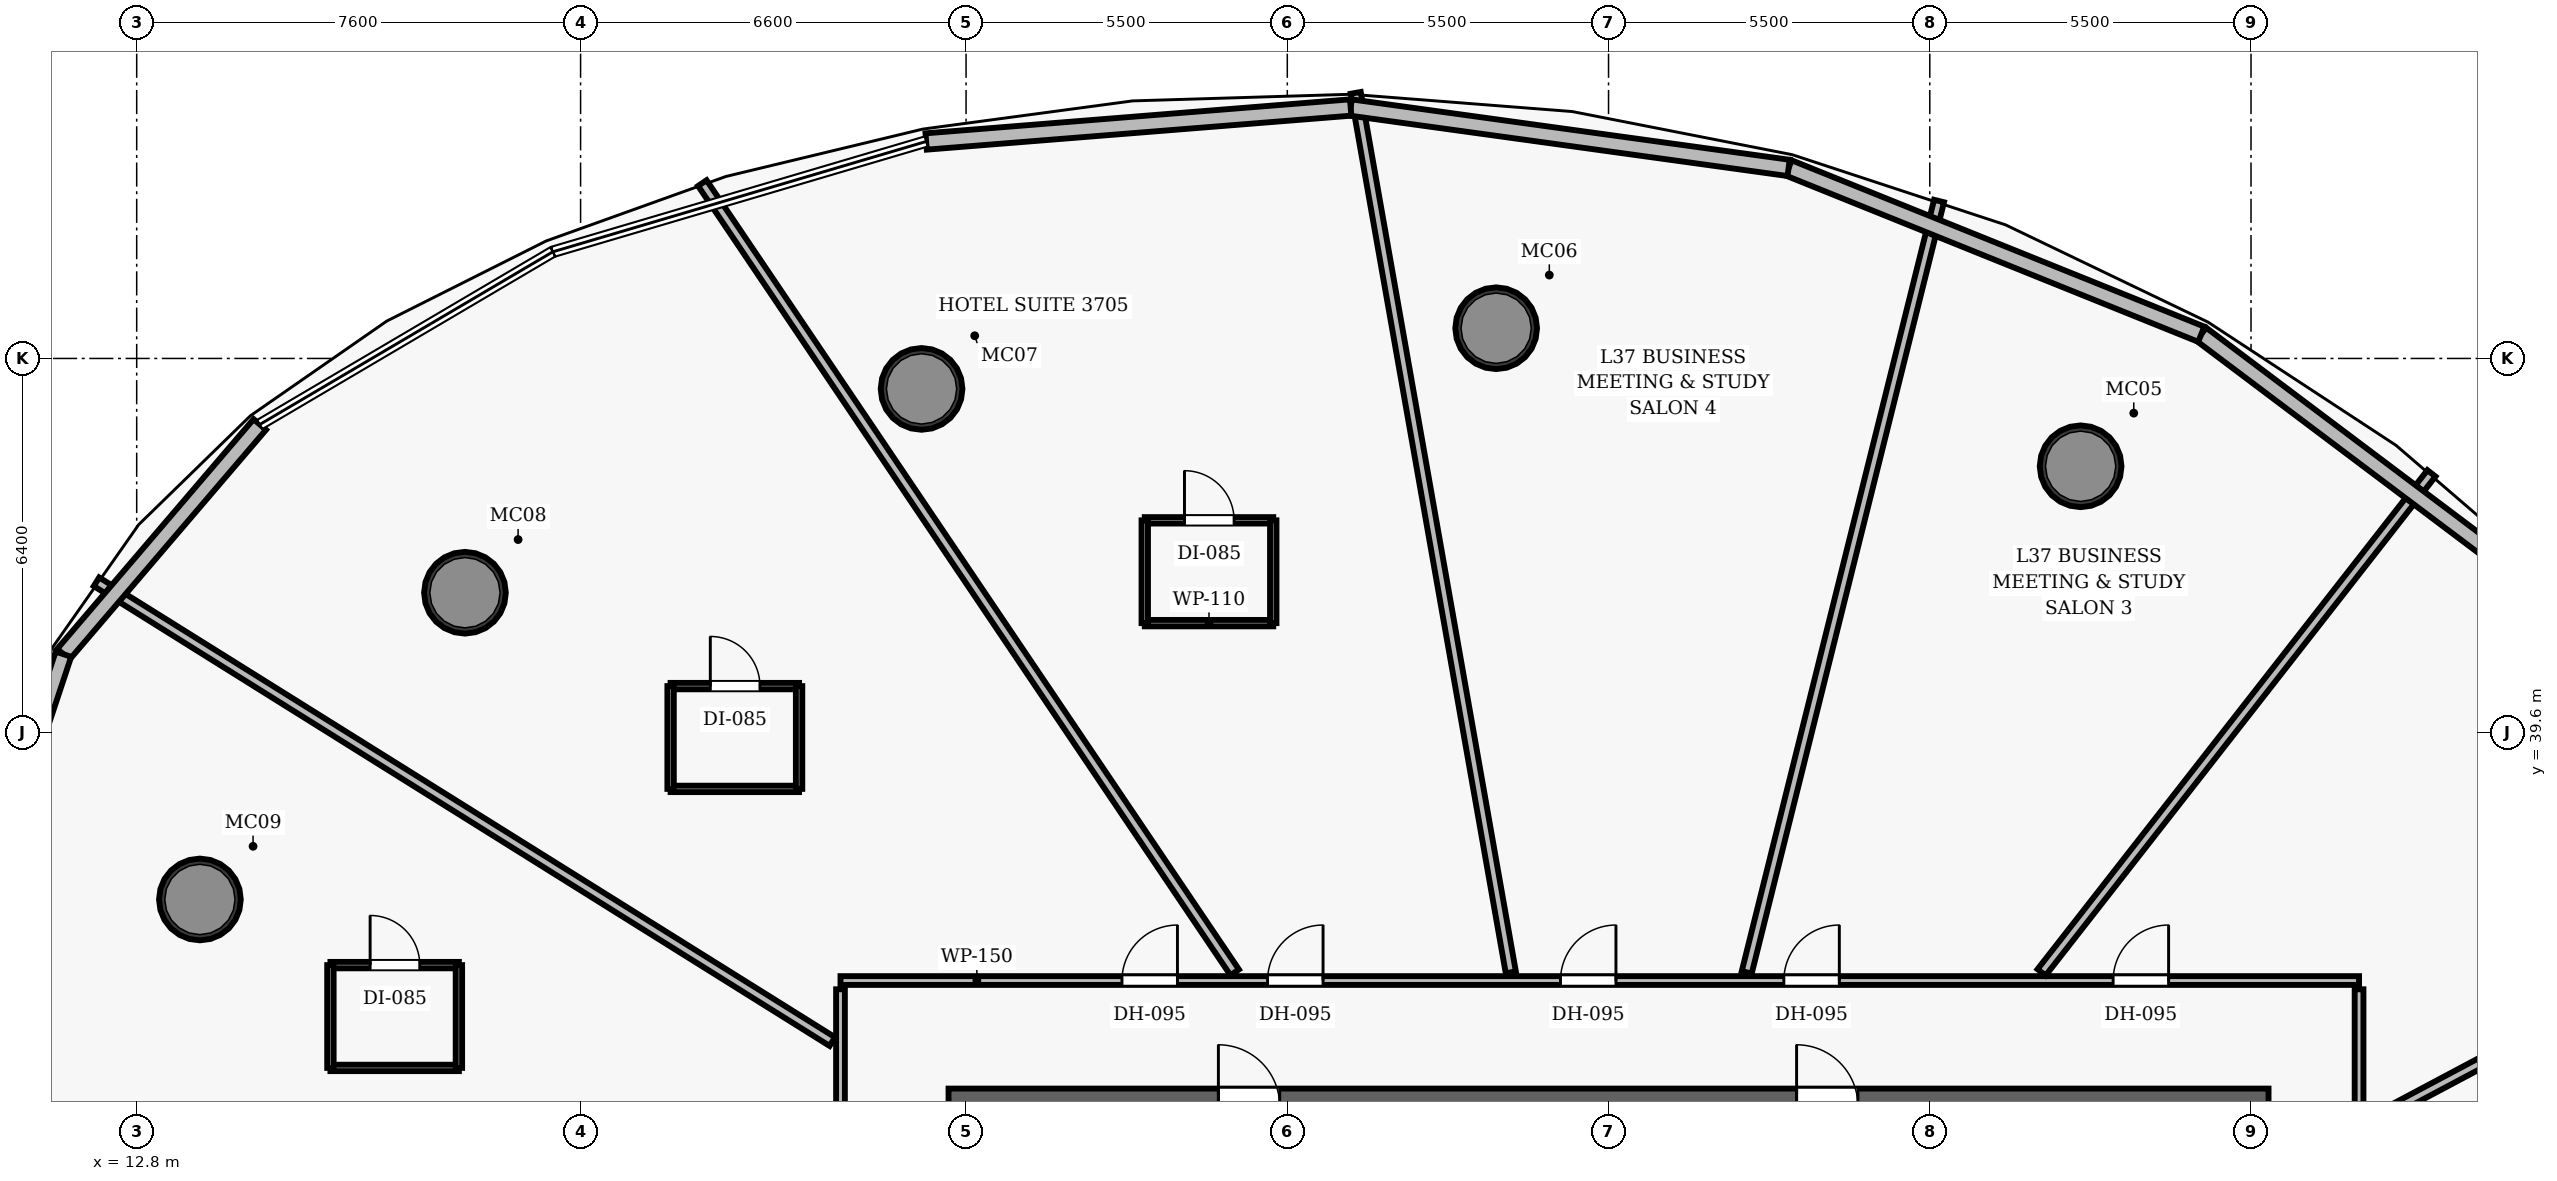
"""IFC4 building model, lengths in metres.
Left out: names, types, materials, properties, quantities, classifications, styles, units other than length and angle.
Written with IfcOpenShell. Run it as: python <this file> out.ifc"""

import sys

from ifc_helpers import new_model, si_unit, direction, frame, frame_2d, origin, origin_2d, place, context, subcontext, project, spatial, rectangle, hollow_circle, extrude, element, fill, save


model = new_model("IFC4")
c1 = context("Model", 3, precision=1e-05, world=origin(), true_north=direction((0.0, 1.0)))
c2 = subcontext(c1, "Body", "Model", "MODEL_VIEW")
j1 = project(units=[si_unit("LENGTHUNIT", "METRE"), si_unit("PLANEANGLEUNIT", "RADIAN")], contexts=[c1])
p1 = place(None, origin())
s1 = spatial("IfcSite", under=j1, at=p1, CompositionType="ELEMENT")
p2 = place(p1, origin())
s2 = spatial("IfcBuilding", under=s1, at=p2, CompositionType="ELEMENT")
p3 = place(p2, frame((0.0, 0.0, 148.3)))
s3 = spatial("IfcBuildingStorey", under=s2, at=p3, CompositionType="ELEMENT", Elevation=148.3)
p4 = place(p3, frame((26.7, 33.2, 0.0), z_axis=(0.0, 0.0, 1.0), x_axis=(1.0, 0.0, 0.0)))
e1 = element("IfcWall", 1, at=p4, inside=s3, PredefinedType="SHEAR", context=c2, shape_type="SweptSolid", body=[
    extrude(rectangle(XDim=22.6, YDim=0.6, at=frame_2d((11.3, 0.0))), origin(), (0.0, 0.0, 1.0), 3.5),
])
p5 = place(p4, frame((4.62, 0.0, 0.0)))
e2 = element("IfcOpeningElement", 2, at=p5, cuts=e1, PredefinedType="OPENING", context=c2, shape_type="SweptSolid", body=[
    extrude(rectangle(XDim=1.05, YDim=2.15, at=frame_2d((0.525, 1.075))), frame((0.0, 0.31, 0.0), z_axis=(0.0, -1.0, 0.0), x_axis=(1.0, 0.0, 0.0)), (0.0, 0.0, 1.0), 0.62),
])
p6 = place(p4, frame((14.52, 0.0, 0.0)))
e3 = element("IfcOpeningElement", 3, at=p6, cuts=e1, PredefinedType="OPENING", context=c2, shape_type="SweptSolid", body=[
    extrude(rectangle(XDim=1.05, YDim=2.15, at=frame_2d((0.525, 1.075))), frame((0.0, 0.31, 0.0), z_axis=(0.0, -1.0, 0.0), x_axis=(1.0, 0.0, 0.0)), (0.0, 0.0, 1.0), 0.62),
])
for number, where, z_axis, x_axis in (
    (4, (46.083, 44.154, 0.0), (0.0, 0.0, 1.0), (1.0, 0.0, 0.0)),
    (5, (36.076, 46.517, 0.0), (0.0, 0.0, 1.0), (1.0, 0.0, 0.0)),
    (6, (26.238, 45.479, 0.0), (0.0, 0.0, 1.0), (1.0, 0.0, 0.0)),
    (7, (18.42, 41.989, 0.0), (0.0, 0.0, 1.0), (1.0, 0.0, 0.0)),
    (8, (13.882, 36.738, 0.0), (0.0, 0.0, 1.0), (1.0, 0.0, 0.0)),
):
    element("IfcColumn", number, at=place(p3, frame(where, z_axis=z_axis, x_axis=x_axis)), inside=s3, PredefinedType="COLUMN", context=c2, shape_type="SweptSolid", body=[
        extrude(hollow_circle(Radius=0.7, WallThickness=0.055, at=origin_2d()), origin(), (0.0, 0.0, 1.0), 3.5),
    ])
p7 = place(p3, frame((24.85, 35.35, 0.0), z_axis=(0.0, 0.0, 1.0), x_axis=(1.0, 0.0, 0.0)))
e9 = element("IfcWall", 9, at=p7, inside=s3, PredefinedType="PARTITIONING", context=c2, shape_type="SweptSolid", body=[
    extrude(rectangle(XDim=26.0, YDim=0.15, at=frame_2d((13.0, 0.0))), origin(), (0.0, 0.0, 1.0), 2.675),
])
p8 = place(p7, frame((21.789, 0.0, 0.0)))
e10 = element("IfcOpeningElement", 10, at=p8, cuts=e9, PredefinedType="OPENING", context=c2, shape_type="SweptSolid", body=[
    extrude(rectangle(XDim=0.95, YDim=2.15, at=frame_2d((0.475, 1.075))), frame((0.0, 0.085, 0.0), z_axis=(0.0, -1.0, 0.0), x_axis=(1.0, 0.0, 0.0)), (0.0, 0.0, 1.0), 0.17),
])
p9 = place(p7, frame((16.151, 0.0, 0.0)))
e11 = element("IfcOpeningElement", 11, at=p9, cuts=e9, PredefinedType="OPENING", context=c2, shape_type="SweptSolid", body=[
    extrude(rectangle(XDim=0.95, YDim=2.15, at=frame_2d((0.475, 1.075))), frame((0.0, 0.085, 0.0), z_axis=(0.0, -1.0, 0.0), x_axis=(1.0, 0.0, 0.0)), (0.0, 0.0, 1.0), 0.17),
])
p10 = place(p7, frame((12.327, 0.0, 0.0)))
e12 = element("IfcOpeningElement", 12, at=p10, cuts=e9, PredefinedType="OPENING", context=c2, shape_type="SweptSolid", body=[
    extrude(rectangle(XDim=0.95, YDim=2.15, at=frame_2d((0.475, 1.075))), frame((0.0, 0.085, 0.0), z_axis=(0.0, -1.0, 0.0), x_axis=(1.0, 0.0, 0.0)), (0.0, 0.0, 1.0), 0.17),
])
p11 = place(p7, frame((7.312, 0.0, 0.0)))
e13 = element("IfcOpeningElement", 13, at=p11, cuts=e9, PredefinedType="OPENING", context=c2, shape_type="SweptSolid", body=[
    extrude(rectangle(XDim=0.95, YDim=2.15, at=frame_2d((0.475, 1.075))), frame((0.0, 0.085, 0.0), z_axis=(0.0, -1.0, 0.0), x_axis=(1.0, 0.0, 0.0)), (0.0, 0.0, 1.0), 0.17),
])
p12 = place(p7, frame((4.819, 0.0, 0.0)))
e14 = element("IfcOpeningElement", 14, at=p12, cuts=e9, PredefinedType="OPENING", context=c2, shape_type="SweptSolid", body=[
    extrude(rectangle(XDim=0.95, YDim=2.15, at=frame_2d((0.475, 1.075))), frame((0.0, 0.085, 0.0), z_axis=(0.0, -1.0, 0.0), x_axis=(1.0, 0.0, 0.0)), (0.0, 0.0, 1.0), 0.17),
])
p13 = place(p3, frame((24.85, 27.08, 0.0), z_axis=(0.0, 0.0, 1.0), x_axis=(0.0, 1.0, 0.0)))
e15 = element("IfcWall", 15, at=p13, inside=s3, PredefinedType="PARTITIONING", context=c2, shape_type="SweptSolid", body=[
    extrude(rectangle(XDim=8.12, YDim=0.15, at=frame_2d((4.06, 0.0))), origin(), (0.0, 0.0, 1.0), 2.675),
])
p14 = place(p13, frame((1.77, 0.0, 0.0)))
e16 = element("IfcOpeningElement", 16, at=p14, cuts=e15, PredefinedType="OPENING", context=c2, shape_type="SweptSolid", body=[
    extrude(rectangle(XDim=0.95, YDim=2.15, at=frame_2d((0.475, 1.075))), frame((0.0, 0.085, 0.0), z_axis=(0.0, -1.0, 0.0), x_axis=(1.0, 0.0, 0.0)), (0.0, 0.0, 1.0), 0.17),
])
p15 = place(p3, frame((50.85, 27.08, 0.0), z_axis=(0.0, 0.0, 1.0), x_axis=(0.0, 1.0, 0.0)))
e17 = element("IfcWall", 17, at=p15, inside=s3, PredefinedType="PARTITIONING", context=c2, shape_type="SweptSolid", body=[
    extrude(rectangle(XDim=8.12, YDim=0.15, at=frame_2d((4.06, 0.0))), origin(), (0.0, 0.0, 1.0), 2.675),
])
p16 = place(p15, frame((1.054, 0.0, 0.0)))
e18 = element("IfcOpeningElement", 18, at=p16, cuts=e17, PredefinedType="OPENING", context=c2, shape_type="SweptSolid", body=[
    extrude(rectangle(XDim=0.95, YDim=2.15, at=frame_2d((0.475, 1.075))), frame((0.0, 0.085, 0.0), z_axis=(0.0, -1.0, 0.0), x_axis=(1.0, 0.0, 0.0)), (0.0, 0.0, 1.0), 0.17),
])
p17 = place(p3, frame((50.99, 32.907, 0.0), z_axis=(0.0, 0.0, 1.0), x_axis=(0.882956390808, 0.469455015877, 0.0)))
e19 = element("IfcWall", 19, at=p17, inside=s3, PredefinedType="PARTITIONING", context=c2, shape_type="SweptSolid", body=[
    extrude(rectangle(XDim=8.613, YDim=0.175, at=frame_2d((4.307, 0.0))), origin(), (0.0, 0.0, 1.0), 2.675),
])
p18 = place(p3, frame((45.414, 35.49, 0.0), z_axis=(0.0, 0.0, 1.0), x_axis=(0.615657151534, 0.788014131704, 0.0)))
e20 = element("IfcWall", 20, at=p18, inside=s3, PredefinedType="PARTITIONING", context=c2, shape_type="SweptSolid", body=[
    extrude(rectangle(XDim=10.842, YDim=0.175, at=frame_2d((5.421, 0.0))), origin(), (0.0, 0.0, 1.0), 2.675),
])
p19 = place(p3, frame((40.366, 35.49, 0.0), z_axis=(0.0, 0.0, 1.0), x_axis=(0.241919334029, 0.970296364944, 0.0)))
e21 = element("IfcWall", 21, at=p19, inside=s3, PredefinedType="PARTITIONING", context=c2, shape_type="SweptSolid", body=[
    extrude(rectangle(XDim=13.61, YDim=0.175, at=frame_2d((6.805, 0.0))), origin(), (0.0, 0.0, 1.0), 2.675),
])
p20 = place(p3, frame((36.327, 35.49, 0.0), z_axis=(0.0, 0.0, 1.0), x_axis=(-0.173651426597, 0.984807180133, 0.0)))
e22 = element("IfcWall", 22, at=p20, inside=s3, PredefinedType="PARTITIONING", context=c2, shape_type="SweptSolid", body=[
    extrude(rectangle(XDim=15.289, YDim=0.175, at=frame_2d((7.645, 0.0))), origin(), (0.0, 0.0, 1.0), 2.675),
])
p21 = place(p3, frame((31.599, 35.49, 0.0), z_axis=(0.0, 0.0, 1.0), x_axis=(-0.55918931687, 0.829039991736, 0.0)))
e23 = element("IfcWall", 23, at=p21, inside=s3, PredefinedType="PARTITIONING", context=c2, shape_type="SweptSolid", body=[
    extrude(rectangle(XDim=16.299, YDim=0.175, at=frame_2d((8.149, 0.0))), origin(), (0.0, 0.0, 1.0), 2.675),
])
p22 = place(p3, frame((24.71, 34.304, 0.0), z_axis=(0.0, 0.0, 1.0), x_axis=(-0.848041694206, 0.529929509357, 0.0)))
e24 = element("IfcWall", 24, at=p22, inside=s3, PredefinedType="PARTITIONING", context=c2, shape_type="SweptSolid", body=[
    extrude(rectangle(XDim=14.856, YDim=0.175, at=frame_2d((7.428, 0.0))), origin(), (0.0, 0.0, 1.0), 2.675),
])
p23 = place(p3, frame((30.06, 41.469, 0.0), z_axis=(0.0, 0.0, 1.0), x_axis=(1.0, 0.0, 0.0)))
e25 = element("IfcWall", 25, at=p23, inside=s3, PredefinedType="PARTITIONING", context=c2, shape_type="SweptSolid", body=[
    extrude(rectangle(XDim=2.2, YDim=0.11, at=frame_2d((1.1, 0.0))), origin(), (0.0, 0.0, 1.0), 2.675),
])
p24 = place(p3, frame((30.06, 43.229, 0.0), z_axis=(0.0, 0.0, 1.0), x_axis=(1.0, 0.0, 0.0)))
e26 = element("IfcWall", 26, at=p24, inside=s3, PredefinedType="PARTITIONING", context=c2, shape_type="SweptSolid", body=[
    extrude(rectangle(XDim=2.2, YDim=0.11, at=frame_2d((1.1, 0.0))), origin(), (0.0, 0.0, 1.0), 2.675),
])
p25 = place(p24, frame((0.68, 0.0, 0.0)))
e27 = element("IfcOpeningElement", 27, at=p25, cuts=e26, PredefinedType="OPENING", context=c2, shape_type="SweptSolid", body=[
    extrude(rectangle(XDim=0.85, YDim=2.1, at=frame_2d((0.425, 1.05))), frame((0.0, 0.065, 0.0), z_axis=(0.0, -1.0, 0.0), x_axis=(1.0, 0.0, 0.0)), (0.0, 0.0, 1.0), 0.13),
])
for number, where, z_axis, x_axis in (
    (28, (30.06, 41.469, 0.0), (0.0, 0.0, 1.0), (0.0, 1.0, 0.0)),
    (29, (32.26, 41.469, 0.0), (0.0, 0.0, 1.0), (0.0, 1.0, 0.0)),
):
    element("IfcWall", number, at=place(p3, frame(where, z_axis=z_axis, x_axis=x_axis)), inside=s3, PredefinedType="PARTITIONING", context=c2, shape_type="SweptSolid", body=[
        extrude(rectangle(XDim=1.76, YDim=0.11, at=frame_2d((0.88, 0.0))), origin(), (0.0, 0.0, 1.0), 2.675),
    ])
p26 = place(p3, frame((21.941, 38.631, 0.0), z_axis=(0.0, 0.0, 1.0), x_axis=(1.0, 0.0, 0.0)))
e30 = element("IfcWall", 30, at=p26, inside=s3, PredefinedType="PARTITIONING", context=c2, shape_type="SweptSolid", body=[
    extrude(rectangle(XDim=2.2, YDim=0.11, at=frame_2d((1.1, 0.0))), origin(), (0.0, 0.0, 1.0), 2.675),
])
p27 = place(p3, frame((21.941, 40.391, 0.0), z_axis=(0.0, 0.0, 1.0), x_axis=(1.0, 0.0, 0.0)))
e31 = element("IfcWall", 31, at=p27, inside=s3, PredefinedType="PARTITIONING", context=c2, shape_type="SweptSolid", body=[
    extrude(rectangle(XDim=2.2, YDim=0.11, at=frame_2d((1.1, 0.0))), origin(), (0.0, 0.0, 1.0), 2.675),
])
p28 = place(p27, frame((0.68, 0.0, 0.0)))
e32 = element("IfcOpeningElement", 32, at=p28, cuts=e31, PredefinedType="OPENING", context=c2, shape_type="SweptSolid", body=[
    extrude(rectangle(XDim=0.85, YDim=2.1, at=frame_2d((0.425, 1.05))), frame((0.0, 0.065, 0.0), z_axis=(0.0, -1.0, 0.0), x_axis=(1.0, 0.0, 0.0)), (0.0, 0.0, 1.0), 0.13),
])
for number, where, z_axis, x_axis in (
    (33, (21.941, 38.631, 0.0), (0.0, 0.0, 1.0), (0.0, 1.0, 0.0)),
    (34, (24.141, 38.631, 0.0), (0.0, 0.0, 1.0), (0.0, 1.0, 0.0)),
):
    element("IfcWall", number, at=place(p3, frame(where, z_axis=z_axis, x_axis=x_axis)), inside=s3, PredefinedType="PARTITIONING", context=c2, shape_type="SweptSolid", body=[
        extrude(rectangle(XDim=1.76, YDim=0.11, at=frame_2d((0.88, 0.0))), origin(), (0.0, 0.0, 1.0), 2.675),
    ])
p29 = place(p3, frame((16.117, 33.854, 0.0), z_axis=(0.0, 0.0, 1.0), x_axis=(1.0, 0.0, 0.0)))
e35 = element("IfcWall", 35, at=p29, inside=s3, PredefinedType="PARTITIONING", context=c2, shape_type="SweptSolid", body=[
    extrude(rectangle(XDim=2.2, YDim=0.11, at=frame_2d((1.1, 0.0))), origin(), (0.0, 0.0, 1.0), 2.675),
])
p30 = place(p3, frame((16.117, 35.614, 0.0), z_axis=(0.0, 0.0, 1.0), x_axis=(1.0, 0.0, 0.0)))
e36 = element("IfcWall", 36, at=p30, inside=s3, PredefinedType="PARTITIONING", context=c2, shape_type="SweptSolid", body=[
    extrude(rectangle(XDim=2.2, YDim=0.11, at=frame_2d((1.1, 0.0))), origin(), (0.0, 0.0, 1.0), 2.675),
])
p31 = place(p30, frame((0.68, 0.0, 0.0)))
e37 = element("IfcOpeningElement", 37, at=p31, cuts=e36, PredefinedType="OPENING", context=c2, shape_type="SweptSolid", body=[
    extrude(rectangle(XDim=0.85, YDim=2.1, at=frame_2d((0.425, 1.05))), frame((0.0, 0.065, 0.0), z_axis=(0.0, -1.0, 0.0), x_axis=(1.0, 0.0, 0.0)), (0.0, 0.0, 1.0), 0.13),
])
for number, where, z_axis, x_axis in (
    (38, (16.117, 33.854, 0.0), (0.0, 0.0, 1.0), (0.0, 1.0, 0.0)),
    (39, (18.317, 33.854, 0.0), (0.0, 0.0, 1.0), (0.0, 1.0, 0.0)),
):
    element("IfcWall", number, at=place(p3, frame(where, z_axis=z_axis, x_axis=x_axis)), inside=s3, PredefinedType="PARTITIONING", context=c2, shape_type="SweptSolid", body=[
        extrude(rectangle(XDim=1.76, YDim=0.11, at=frame_2d((0.88, 0.0))), origin(), (0.0, 0.0, 1.0), 2.675),
    ])
p32 = place(p3, frame((48.148, 46.415, 0.0), z_axis=(0.0, 0.0, 1.0), x_axis=(0.799187740933, -0.601081487606, 0.0)))
e40 = element("IfcWall", 40, at=p32, inside=s3, PredefinedType="SOLIDWALL", context=c2, shape_type="SweptSolid", body=[
    extrude(rectangle(XDim=7.617, YDim=0.28, at=frame_2d((3.809, 0.0))), origin(), (0.0, 0.0, 1.0), 3.26),
])
p33 = place(p3, frame((41.083, 49.262, 0.0), z_axis=(0.0, 0.0, 1.0), x_axis=(0.927496504314, -0.373831826474, 0.0)))
e41 = element("IfcWall", 41, at=p33, inside=s3, PredefinedType="SOLIDWALL", context=c2, shape_type="SweptSolid", body=[
    extrude(rectangle(XDim=7.617, YDim=0.28, at=frame_2d((3.809, 0.0))), origin(), (0.0, 0.0, 1.0), 3.26),
])
p34 = place(p3, frame((33.585, 50.296, 0.0), z_axis=(0.0, 0.0, 1.0), x_axis=(0.99062609674, -0.136601377953, 0.0)))
e42 = element("IfcWall", 42, at=p34, inside=s3, PredefinedType="SOLIDWALL", context=c2, shape_type="SweptSolid", body=[
    extrude(rectangle(XDim=7.569, YDim=0.28, at=frame_2d((3.785, 0.0))), origin(), (0.0, 0.0, 1.0), 3.26),
])
p35 = place(p3, frame((26.316, 49.714, 0.0), z_axis=(0.0, 0.0, 1.0), x_axis=(0.996812190565, 0.079783812519, 0.0)))
e43 = element("IfcWall", 43, at=p35, inside=s3, PredefinedType="SOLIDWALL", context=c2, shape_type="SweptSolid", body=[
    extrude(rectangle(XDim=7.292, YDim=0.28, at=frame_2d((3.646, 0.0))), origin(), (0.0, 0.0, 1.0), 3.26),
])
for number, where, z_axis, x_axis in (
    (44, (11.545, 40.937, 0.0), (0.0, 0.0, 1.0), (0.65, 0.76, 0.0)),
    (45, (9.915, 36.026, 0.0), (0.0, 0.0, 1.0), (0.315, 0.949, 0.0)),
):
    element("IfcWall", number, at=place(p3, frame(where, z_axis=z_axis, x_axis=x_axis)), inside=s3, PredefinedType="SOLIDWALL", context=c2, shape_type="SweptSolid", body=[
        extrude(rectangle(XDim=5.174, YDim=0.28, at=frame_2d((2.587, 0.0))), origin(), (0.0, 0.0, 1.0), 3.26),
    ])
p36 = place(p8, origin())
e46 = element("IfcDoor", 46, at=p36, inside=s3, OperationType="SINGLE_SWING_RIGHT", PredefinedType="DOOR", context=c2, shape_type="SweptSolid", body=[
    extrude(rectangle(XDim=0.95, YDim=2.15, at=frame_2d((0.475, 1.075))), frame((0.0, 0.025, 0.0), z_axis=(0.0, -1.0, 0.0), x_axis=(1.0, 0.0, 0.0)), (0.0, 0.0, 1.0), 0.05),
])
fill(e10, e46)
p37 = place(p9, origin())
e47 = element("IfcDoor", 47, at=p37, inside=s3, OperationType="SINGLE_SWING_RIGHT", PredefinedType="DOOR", context=c2, shape_type="SweptSolid", body=[
    extrude(rectangle(XDim=0.95, YDim=2.15, at=frame_2d((0.475, 1.075))), frame((0.0, 0.025, 0.0), z_axis=(0.0, -1.0, 0.0), x_axis=(1.0, 0.0, 0.0)), (0.0, 0.0, 1.0), 0.05),
])
fill(e11, e47)
p38 = place(p10, origin())
e48 = element("IfcDoor", 48, at=p38, inside=s3, OperationType="SINGLE_SWING_RIGHT", PredefinedType="DOOR", context=c2, shape_type="SweptSolid", body=[
    extrude(rectangle(XDim=0.95, YDim=2.15, at=frame_2d((0.475, 1.075))), frame((0.0, 0.025, 0.0), z_axis=(0.0, -1.0, 0.0), x_axis=(1.0, 0.0, 0.0)), (0.0, 0.0, 1.0), 0.05),
])
fill(e12, e48)
p39 = place(p11, origin())
e49 = element("IfcDoor", 49, at=p39, inside=s3, OperationType="SINGLE_SWING_RIGHT", PredefinedType="DOOR", context=c2, shape_type="SweptSolid", body=[
    extrude(rectangle(XDim=0.95, YDim=2.15, at=frame_2d((0.475, 1.075))), frame((0.0, 0.025, 0.0), z_axis=(0.0, -1.0, 0.0), x_axis=(1.0, 0.0, 0.0)), (0.0, 0.0, 1.0), 0.05),
])
fill(e13, e49)
p40 = place(p25, origin())
e50 = element("IfcDoor", 50, at=p40, inside=s3, OperationType="SINGLE_SWING_LEFT", PredefinedType="DOOR", context=c2, shape_type="SweptSolid", body=[
    extrude(rectangle(XDim=0.85, YDim=2.1, at=frame_2d((0.425, 1.05))), frame((0.0, 0.025, 0.0), z_axis=(0.0, -1.0, 0.0), x_axis=(1.0, 0.0, 0.0)), (0.0, 0.0, 1.0), 0.05),
])
fill(e27, e50)
p41 = place(p12, origin())
e51 = element("IfcDoor", 51, at=p41, inside=s3, OperationType="SINGLE_SWING_RIGHT", PredefinedType="DOOR", context=c2, shape_type="SweptSolid", body=[
    extrude(rectangle(XDim=0.95, YDim=2.15, at=frame_2d((0.475, 1.075))), frame((0.0, 0.025, 0.0), z_axis=(0.0, -1.0, 0.0), x_axis=(1.0, 0.0, 0.0)), (0.0, 0.0, 1.0), 0.05),
])
fill(e14, e51)
p42 = place(p28, origin())
e52 = element("IfcDoor", 52, at=p42, inside=s3, OperationType="SINGLE_SWING_LEFT", PredefinedType="DOOR", context=c2, shape_type="SweptSolid", body=[
    extrude(rectangle(XDim=0.85, YDim=2.1, at=frame_2d((0.425, 1.05))), frame((0.0, 0.025, 0.0), z_axis=(0.0, -1.0, 0.0), x_axis=(1.0, 0.0, 0.0)), (0.0, 0.0, 1.0), 0.05),
])
fill(e32, e52)
p43 = place(p31, origin())
e53 = element("IfcDoor", 53, at=p43, inside=s3, OperationType="SINGLE_SWING_LEFT", PredefinedType="DOOR", context=c2, shape_type="SweptSolid", body=[
    extrude(rectangle(XDim=0.85, YDim=2.1, at=frame_2d((0.425, 1.05))), frame((0.0, 0.025, 0.0), z_axis=(0.0, -1.0, 0.0), x_axis=(1.0, 0.0, 0.0)), (0.0, 0.0, 1.0), 0.05),
])
fill(e37, e53)
save(model, sys.argv[1])
